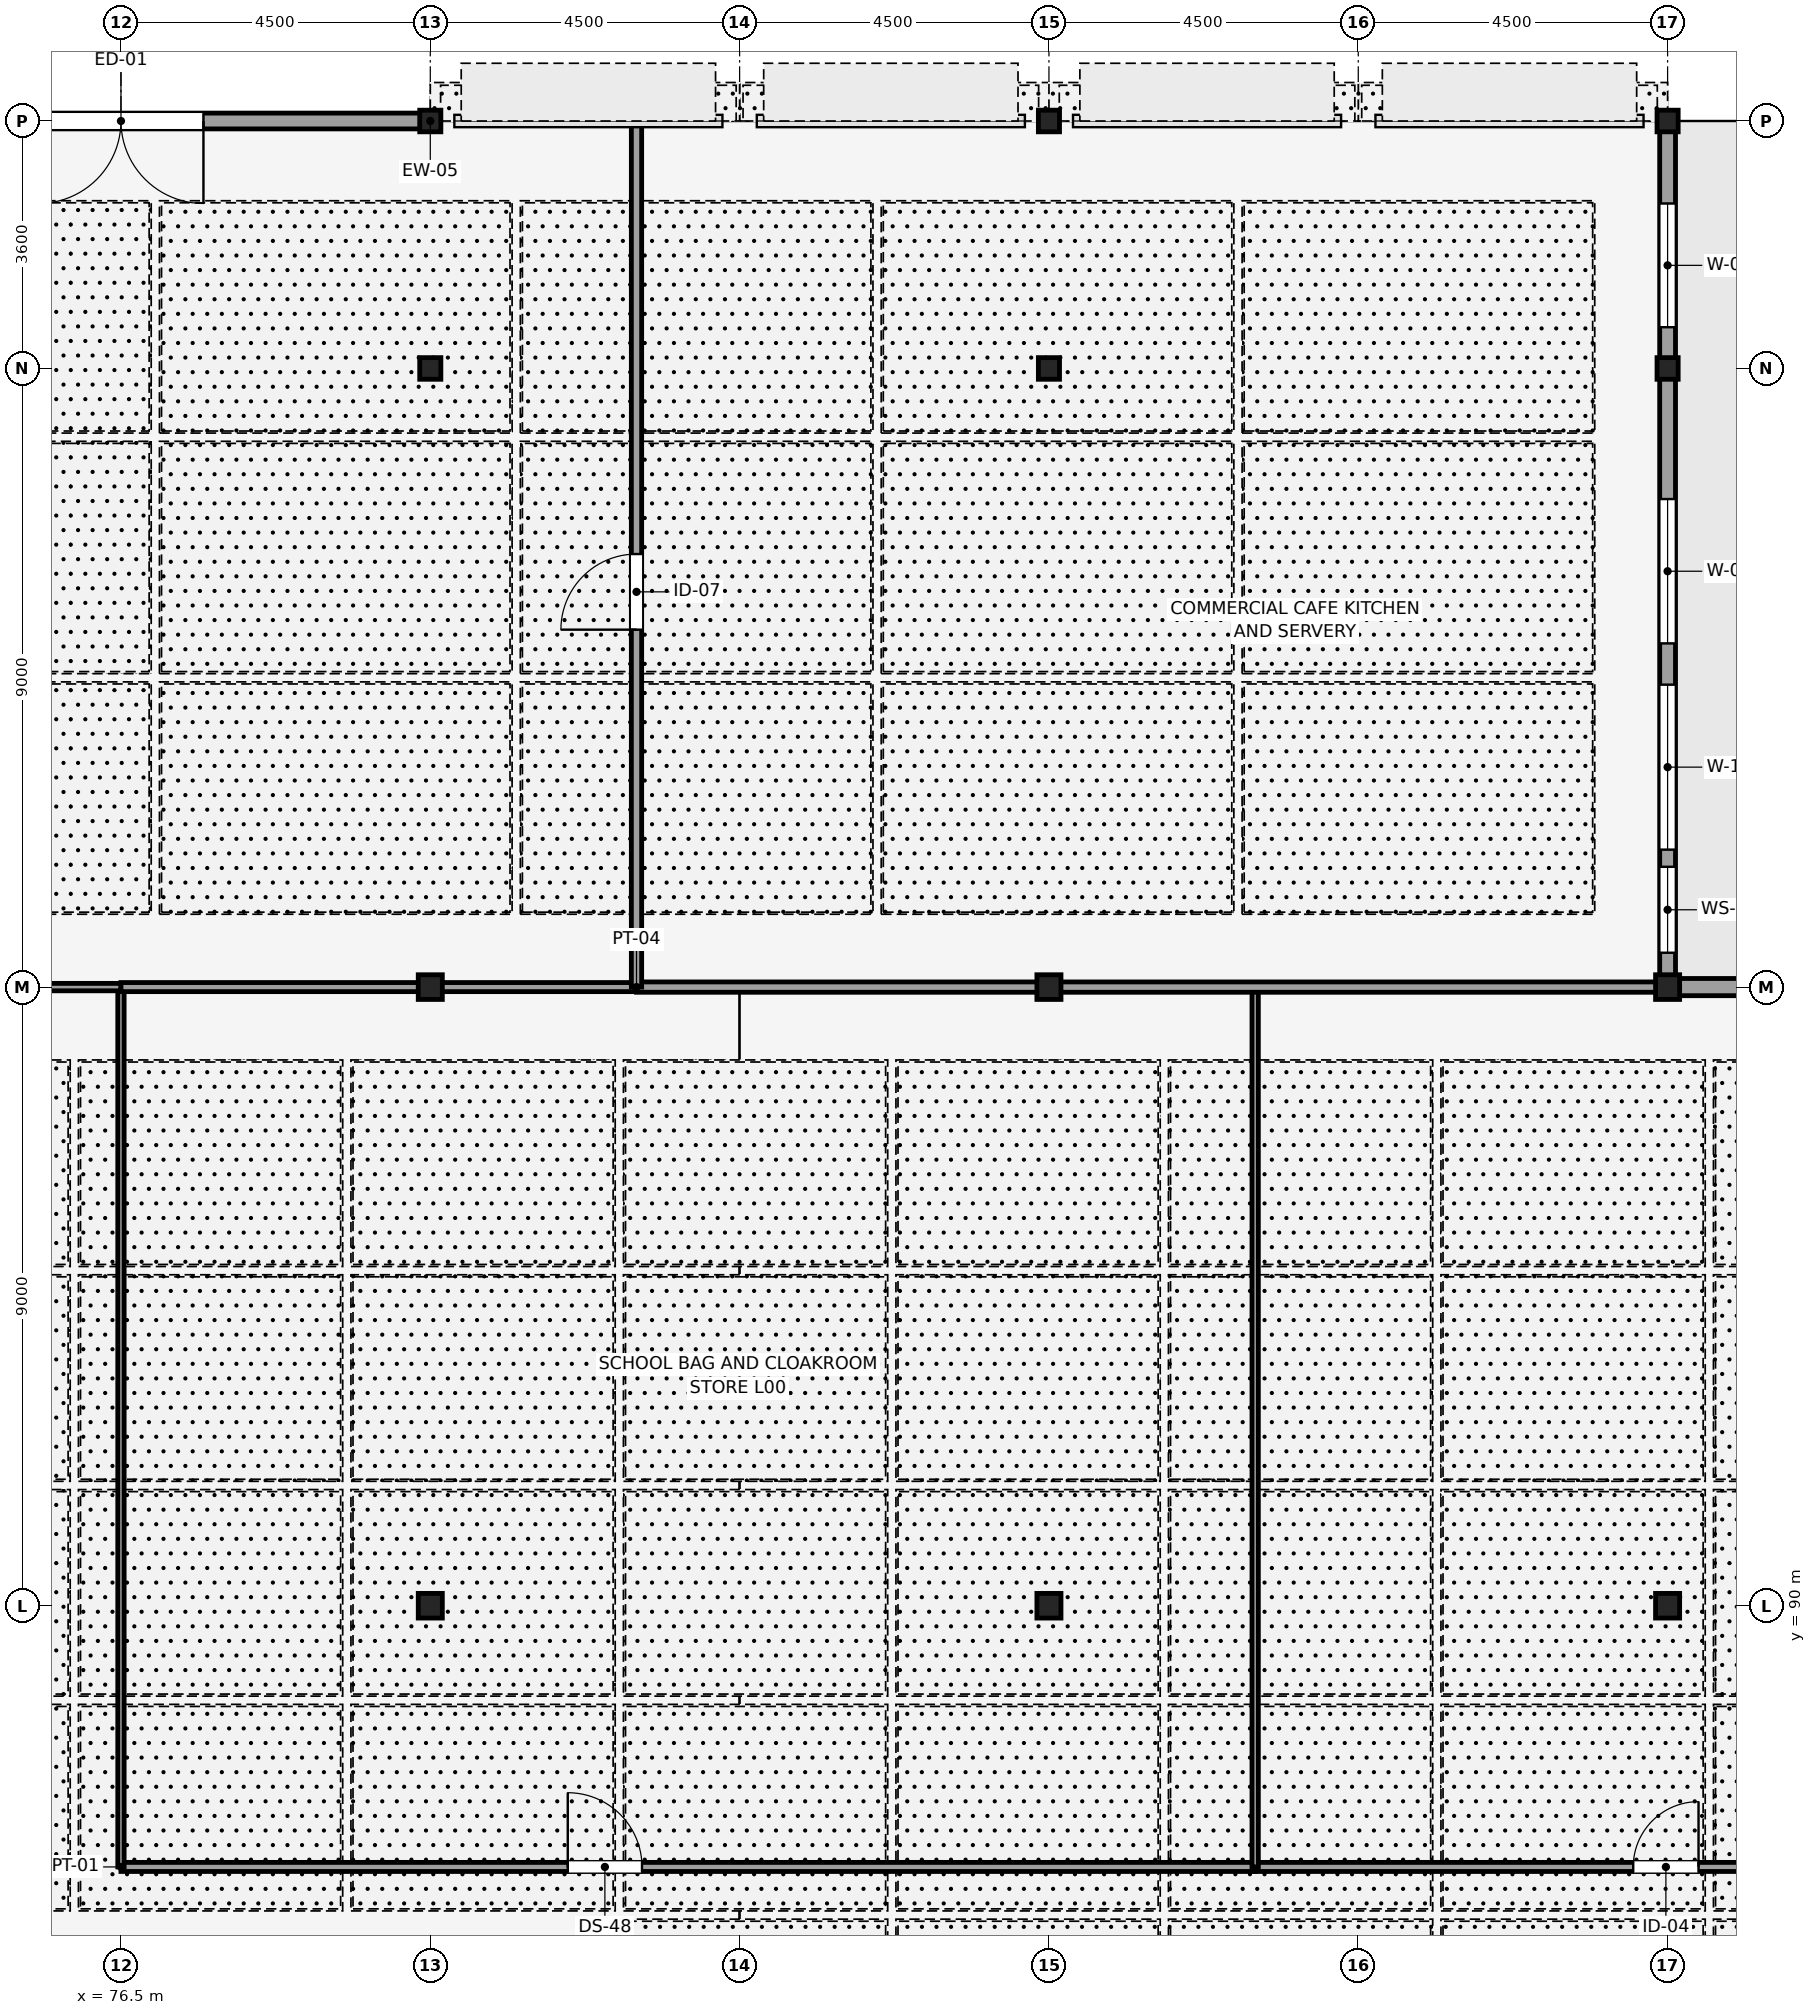
"""IFC4 building model, lengths in metres.
Left out: names, types, materials, properties, quantities, classifications, styles, units other than length and angle.
Written with IfcOpenShell. Run it as: python <this file> out.ifc"""

import sys

from ifc_helpers import new_model, si_unit, direction, frame, frame_2d, origin, origin_2d, place, context, subcontext, project, spatial, rectangle, i_section, extrude, element, fill, save


model = new_model("IFC4")
c1 = context("Model", 3, precision=1e-05, world=origin(), true_north=direction((0.0, 1.0)))
c2 = subcontext(c1, "Body", "Model", "MODEL_VIEW")
j1 = project(units=[si_unit("LENGTHUNIT", "METRE"), si_unit("PLANEANGLEUNIT", "RADIAN")], contexts=[c1])
p1 = place(None, origin())
s1 = spatial("IfcSite", under=j1, at=p1, CompositionType="ELEMENT")
p2 = place(p1, origin())
s2 = spatial("IfcBuilding", under=s1, at=p2, CompositionType="ELEMENT")
p3 = place(p2, origin())
s3 = spatial("IfcBuildingStorey", under=s2, at=p3, CompositionType="ELEMENT", Elevation=0.0)
for number, where, z_axis, x_axis in (
    (1, (81.0, 90.0, 0.0), (0.0, 0.0, 1.0), (1.0, 0.0, 0.0)),
    (2, (81.0, 99.0, 0.0), (0.0, 0.0, 1.0), (1.0, 0.0, 0.0)),
):
    element("IfcColumn", number, at=place(p3, frame(where, z_axis=z_axis, x_axis=x_axis)), inside=s3, PredefinedType="COLUMN", context=c2, shape_type="SweptSolid", body=[
        extrude(i_section(OverallWidth=0.35, OverallDepth=0.359, WebThickness=0.016, FlangeThickness=0.024, FilletRadius=0.014, at=origin_2d()), origin(), (0.0, 0.0, 1.0), 5.4),
    ])
for number, where, z_axis, x_axis in (
    (3, (81.0, 108.0, 0.0), (0.0, 0.0, 1.0), (1.0, 0.0, 0.0)),
    (4, (81.0, 111.6, 0.0), (0.0, 0.0, 1.0), (1.0, 0.0, 0.0)),
):
    element("IfcColumn", number, at=place(p3, frame(where, z_axis=z_axis, x_axis=x_axis)), inside=s3, PredefinedType="COLUMN", context=c2, shape_type="SweptSolid", body=[
        extrude(i_section(OverallWidth=0.307, OverallDepth=0.315, WebThickness=0.012, FlangeThickness=0.019, FilletRadius=0.017, at=origin_2d()), origin(), (0.0, 0.0, 1.0), 5.4),
    ])
for number, where, z_axis, x_axis in (
    (5, (90.0, 90.0, 0.0), (0.0, 0.0, 1.0), (1.0, 0.0, 0.0)),
    (6, (90.0, 99.0, 0.0), (0.0, 0.0, 1.0), (1.0, 0.0, 0.0)),
):
    element("IfcColumn", number, at=place(p3, frame(where, z_axis=z_axis, x_axis=x_axis)), inside=s3, PredefinedType="COLUMN", context=c2, shape_type="SweptSolid", body=[
        extrude(i_section(OverallWidth=0.35, OverallDepth=0.359, WebThickness=0.016, FlangeThickness=0.024, FilletRadius=0.014, at=origin_2d()), origin(), (0.0, 0.0, 1.0), 5.4),
    ])
for number, where, z_axis, x_axis in (
    (7, (90.0, 108.0, 0.0), (0.0, 0.0, 1.0), (1.0, 0.0, 0.0)),
    (8, (90.0, 111.6, 0.0), (0.0, 0.0, 1.0), (1.0, 0.0, 0.0)),
):
    element("IfcColumn", number, at=place(p3, frame(where, z_axis=z_axis, x_axis=x_axis)), inside=s3, PredefinedType="COLUMN", context=c2, shape_type="SweptSolid", body=[
        extrude(i_section(OverallWidth=0.307, OverallDepth=0.315, WebThickness=0.012, FlangeThickness=0.019, FilletRadius=0.017, at=origin_2d()), origin(), (0.0, 0.0, 1.0), 5.4),
    ])
for number, where, z_axis, x_axis in (
    (9, (99.0, 90.0, 0.0), (0.0, 0.0, 1.0), (1.0, 0.0, 0.0)),
    (10, (99.0, 99.0, 0.0), (0.0, 0.0, 1.0), (1.0, 0.0, 0.0)),
):
    element("IfcColumn", number, at=place(p3, frame(where, z_axis=z_axis, x_axis=x_axis)), inside=s3, PredefinedType="COLUMN", context=c2, shape_type="SweptSolid", body=[
        extrude(i_section(OverallWidth=0.35, OverallDepth=0.359, WebThickness=0.016, FlangeThickness=0.024, FilletRadius=0.014, at=origin_2d()), origin(), (0.0, 0.0, 1.0), 5.4),
    ])
for number, where, z_axis, x_axis in (
    (11, (99.0, 108.0, 0.0), (0.0, 0.0, 1.0), (1.0, 0.0, 0.0)),
    (12, (99.0, 111.6, 0.0), (0.0, 0.0, 1.0), (1.0, 0.0, 0.0)),
):
    element("IfcColumn", number, at=place(p3, frame(where, z_axis=z_axis, x_axis=x_axis)), inside=s3, PredefinedType="COLUMN", context=c2, shape_type="SweptSolid", body=[
        extrude(i_section(OverallWidth=0.307, OverallDepth=0.315, WebThickness=0.012, FlangeThickness=0.019, FilletRadius=0.017, at=origin_2d()), origin(), (0.0, 0.0, 1.0), 5.4),
    ])
p4 = place(p3, frame((81.0, 111.6, 0.0), z_axis=(0.0, 0.0, 1.0), x_axis=(-1.0, 0.0, 0.0)))
e13 = element("IfcWall", 13, at=p4, inside=s3, PredefinedType="STANDARD", context=c2, shape_type="SweptSolid", body=[
    extrude(rectangle(XDim=9.0, YDim=0.23, at=frame_2d((4.5, 0.0))), origin(), (0.0, 0.0, 1.0), 5.22),
])
p5 = place(p4, frame((3.3, 0.0, 0.0)))
e14 = element("IfcOpeningElement", 14, at=p5, cuts=e13, PredefinedType="OPENING", context=c2, shape_type="SweptSolid", body=[
    extrude(rectangle(XDim=2.4, YDim=2.7, at=frame_2d((1.2, 1.35))), frame((0.0, 0.125, 0.0), z_axis=(0.0, -1.0, 0.0), x_axis=(1.0, 0.0, 0.0)), (0.0, 0.0, 1.0), 0.25),
])
p6 = place(p3, frame((99.0, 99.0, 0.0), z_axis=(0.0, 0.0, 1.0), x_axis=(0.0, 1.0, 0.0)))
e15 = element("IfcWall", 15, at=p6, inside=s3, PredefinedType="STANDARD", context=c2, shape_type="SweptSolid", body=[
    extrude(rectangle(XDim=12.6, YDim=0.23, at=frame_2d((6.3, 0.0))), origin(), (0.0, 0.0, 1.0), 4.672),
])
p7 = place(p6, frame((2.0, 0.0, 1.0)))
e16 = element("IfcOpeningElement", 16, at=p7, cuts=e15, PredefinedType="OPENING", context=c2, shape_type="SweptSolid", body=[
    extrude(rectangle(XDim=2.4, YDim=1.5, at=frame_2d((1.2, 0.75))), frame((0.0, 0.125, 0.0), z_axis=(0.0, -1.0, 0.0), x_axis=(1.0, 0.0, 0.0)), (0.0, 0.0, 1.0), 0.25),
])
p8 = place(p6, frame((9.6, 0.0, 1.0)))
e17 = element("IfcOpeningElement", 17, at=p8, cuts=e15, PredefinedType="OPENING", context=c2, shape_type="SweptSolid", body=[
    extrude(rectangle(XDim=1.8, YDim=1.5, at=frame_2d((0.9, 0.75))), frame((0.0, 0.125, 0.0), z_axis=(0.0, -1.0, 0.0), x_axis=(1.0, 0.0, 0.0)), (0.0, 0.0, 1.0), 0.25),
])
p9 = place(p6, frame((5.0, 0.0, 0.9)))
e18 = element("IfcOpeningElement", 18, at=p9, cuts=e15, PredefinedType="OPENING", context=c2, shape_type="SweptSolid", body=[
    extrude(rectangle(XDim=2.1, YDim=2.1, at=frame_2d((1.05, 1.05))), frame((0.0, 0.125, 0.0), z_axis=(0.0, -1.0, 0.0), x_axis=(1.0, 0.0, 0.0)), (0.0, 0.0, 1.0), 0.25),
])
p10 = place(p6, frame((0.5, 0.0, 1.0)))
e19 = element("IfcOpeningElement", 19, at=p10, cuts=e15, PredefinedType="OPENING", context=c2, shape_type="SweptSolid", body=[
    extrude(rectangle(XDim=1.25, YDim=1.45, at=frame_2d((0.625, 0.725))), frame((0.0, 0.125, 0.0), z_axis=(0.0, -1.0, 0.0), x_axis=(1.0, 0.0, 0.0)), (0.0, 0.0, 1.0), 0.25),
])
p11 = place(p3, frame((112.5, 99.0, 0.0), z_axis=(0.0, 0.0, 1.0), x_axis=(-1.0, 0.0, 0.0)))
e20 = element("IfcWall", 20, at=p11, inside=s3, PredefinedType="STANDARD", context=c2, shape_type="SweptSolid", body=[
    extrude(rectangle(XDim=13.5, YDim=0.25, at=frame_2d((6.75, 0.0))), origin(), (0.0, 0.0, 1.0), 4.667),
])
p12 = place(p11, frame((1.35, 0.0, 1.0)))
e21 = element("IfcOpeningElement", 21, at=p12, cuts=e20, PredefinedType="OPENING", context=c2, shape_type="SweptSolid", body=[
    extrude(rectangle(XDim=1.8, YDim=1.5, at=frame_2d((0.9, 0.75))), frame((0.0, 0.135, 0.0), z_axis=(0.0, -1.0, 0.0), x_axis=(1.0, 0.0, 0.0)), (0.0, 0.0, 1.0), 0.27),
])
p13 = place(p11, frame((9.6, 0.0, 1.0)))
e22 = element("IfcOpeningElement", 22, at=p13, cuts=e20, PredefinedType="OPENING", context=c2, shape_type="SweptSolid", body=[
    extrude(rectangle(XDim=1.8, YDim=1.5, at=frame_2d((0.9, 0.75))), frame((0.0, 0.135, 0.0), z_axis=(0.0, -1.0, 0.0), x_axis=(1.0, 0.0, 0.0)), (0.0, 0.0, 1.0), 0.27),
])
p14 = place(p11, frame((5.6, 0.0, 1.0)))
e23 = element("IfcOpeningElement", 23, at=p14, cuts=e20, PredefinedType="OPENING", context=c2, shape_type="SweptSolid", body=[
    extrude(rectangle(XDim=3.0, YDim=1.5, at=frame_2d((1.5, 0.75))), frame((0.0, 0.135, 0.0), z_axis=(0.0, -1.0, 0.0), x_axis=(1.0, 0.0, 0.0)), (0.0, 0.0, 1.0), 0.27),
])
p15 = place(p3, frame((76.5, 86.2, 0.0), z_axis=(0.0, 0.0, 1.0), x_axis=(1.0, 0.0, 0.0)))
e24 = element("IfcWall", 24, at=p15, inside=s3, PredefinedType="PARTITIONING", context=c2, shape_type="SweptSolid", body=[
    extrude(rectangle(XDim=16.5, YDim=0.132, at=frame_2d((8.25, 0.0))), origin(), (0.0, 0.0, 1.0), 5.22),
])
p16 = place(p15, frame((6.5, 0.0, 0.0)))
e25 = element("IfcOpeningElement", 25, at=p16, cuts=e24, PredefinedType="OPENING", context=c2, shape_type="SweptSolid", body=[
    extrude(rectangle(XDim=1.08, YDim=2.3, at=frame_2d((0.54, 1.15))), frame((0.0, 0.076, 0.0), z_axis=(0.0, -1.0, 0.0), x_axis=(1.0, 0.0, 0.0)), (0.0, 0.0, 1.0), 0.152),
])
p17 = place(p3, frame((93.0, 86.2, 0.0), z_axis=(0.0, 0.0, 1.0), x_axis=(1.0, 0.0, 0.0)))
e26 = element("IfcWall", 26, at=p17, inside=s3, PredefinedType="PARTITIONING", context=c2, shape_type="SweptSolid", body=[
    extrude(rectangle(XDim=19.5, YDim=0.132, at=frame_2d((9.75, 0.0))), origin(), (0.0, 0.0, 1.0), 5.22),
])
p18 = place(p17, frame((5.5, 0.0, 0.0)))
e27 = element("IfcOpeningElement", 27, at=p18, cuts=e26, PredefinedType="OPENING", context=c2, shape_type="SweptSolid", body=[
    extrude(rectangle(XDim=0.95, YDim=2.15, at=frame_2d((0.475, 1.075))), frame((0.0, 0.076, 0.0), z_axis=(0.0, -1.0, 0.0), x_axis=(1.0, 0.0, 0.0)), (0.0, 0.0, 1.0), 0.152),
])
for number, where, z_axis, x_axis in (
    (28, (76.5, 86.2, 0.0), (0.0, 0.0, 1.0), (0.0, 1.0, 0.0)),
    (29, (93.0, 86.2, 0.0), (0.0, 0.0, 1.0), (0.0, 1.0, 0.0)),
):
    element("IfcWall", number, at=place(p3, frame(where, z_axis=z_axis, x_axis=x_axis)), inside=s3, PredefinedType="PARTITIONING", context=c2, shape_type="SweptSolid", body=[
        extrude(rectangle(XDim=12.8, YDim=0.092, at=frame_2d((6.4, 0.0))), origin(), (0.0, 0.0, 1.0), 5.22),
    ])
p19 = place(p3, frame((72.0, 99.0, 0.0), z_axis=(0.0, 0.0, 1.0), x_axis=(1.0, 0.0, 0.0)))
e30 = element("IfcWall", 30, at=p19, inside=s3, PredefinedType="PARTITIONING", context=c2, shape_type="SweptSolid", body=[
    extrude(rectangle(XDim=4.5, YDim=0.108, at=frame_2d((2.25, 0.0))), origin(), (0.0, 0.0, 1.0), 4.667),
])
p20 = place(p19, frame((1.25, 0.0, 0.0)))
e31 = element("IfcOpeningElement", 31, at=p20, cuts=e30, PredefinedType="OPENING", context=c2, shape_type="SweptSolid", body=[
    extrude(rectangle(XDim=2.0, YDim=2.4, at=frame_2d((1.0, 1.2))), frame((0.0, 0.064, 0.0), z_axis=(0.0, -1.0, 0.0), x_axis=(1.0, 0.0, 0.0)), (0.0, 0.0, 1.0), 0.128),
])
p21 = place(p3, frame((76.5, 99.0, 0.0), z_axis=(0.0, 0.0, 1.0), x_axis=(1.0, 0.0, 0.0)))
e32 = element("IfcWall", 32, at=p21, inside=s3, PredefinedType="PARTITIONING", context=c2, shape_type="SweptSolid", body=[
    extrude(rectangle(XDim=7.5, YDim=0.132, at=frame_2d((3.75, 0.0))), origin(), (0.0, 0.0, 1.0), 4.667),
])
p22 = place(p3, frame((84.0, 99.0, 0.0), z_axis=(0.0, 0.0, 1.0), x_axis=(1.0, 0.0, 0.0)))
e33 = element("IfcWall", 33, at=p22, inside=s3, PredefinedType="PARTITIONING", context=c2, shape_type="SweptSolid", body=[
    extrude(rectangle(XDim=15.0, YDim=0.15, at=frame_2d((7.5, 0.0))), origin(), (0.0, 0.0, 1.0), 4.667),
])
p23 = place(p3, frame((84.0, 99.0, 0.0), z_axis=(0.0, 0.0, 1.0), x_axis=(0.0, 1.0, 0.0)))
e34 = element("IfcWall", 34, at=p23, inside=s3, PredefinedType="PARTITIONING", context=c2, shape_type="SweptSolid", body=[
    extrude(rectangle(XDim=12.6, YDim=0.15, at=frame_2d((6.3, 0.0))), origin(), (0.0, 0.0, 1.0), 5.22),
])
p24 = place(p23, frame((5.2, 0.0, 0.0)))
e35 = element("IfcOpeningElement", 35, at=p24, cuts=e34, PredefinedType="OPENING", context=c2, shape_type="SweptSolid", body=[
    extrude(rectangle(XDim=1.1, YDim=2.15, at=frame_2d((0.55, 1.075))), frame((0.0, 0.085, 0.0), z_axis=(0.0, -1.0, 0.0), x_axis=(1.0, 0.0, 0.0)), (0.0, 0.0, 1.0), 0.17),
])
p25 = place(p5, origin())
e36 = element("IfcDoor", 36, at=p25, inside=s3, OperationType="DOUBLE_DOOR_SINGLE_SWING", PredefinedType="DOOR", context=c2, shape_type="SweptSolid", body=[
    extrude(rectangle(XDim=2.4, YDim=2.7, at=frame_2d((1.2, 1.35))), frame((0.0, 0.025, 0.0), z_axis=(0.0, -1.0, 0.0), x_axis=(1.0, 0.0, 0.0)), (0.0, 0.0, 1.0), 0.05),
])
fill(e14, e36)
p26 = place(p7, origin())
e37 = element("IfcWindow", 37, at=p26, inside=s3, PartitioningType="SINGLE_PANEL", PredefinedType="WINDOW", context=c2, shape_type="SweptSolid", body=[
    extrude(rectangle(XDim=2.4, YDim=1.5, at=frame_2d((1.2, 0.75))), frame((0.0, 0.03, 0.0), z_axis=(0.0, -1.0, 0.0), x_axis=(1.0, 0.0, 0.0)), (0.0, 0.0, 1.0), 0.06),
])
fill(e16, e37)
p27 = place(p8, origin())
e38 = element("IfcWindow", 38, at=p27, inside=s3, PartitioningType="SINGLE_PANEL", PredefinedType="WINDOW", context=c2, shape_type="SweptSolid", body=[
    extrude(rectangle(XDim=1.8, YDim=1.5, at=frame_2d((0.9, 0.75))), frame((0.0, 0.03, 0.0), z_axis=(0.0, -1.0, 0.0), x_axis=(1.0, 0.0, 0.0)), (0.0, 0.0, 1.0), 0.06),
])
fill(e17, e38)
p28 = place(p9, origin())
e39 = element("IfcWindow", 39, at=p28, inside=s3, PartitioningType="SINGLE_PANEL", PredefinedType="WINDOW", context=c2, shape_type="SweptSolid", body=[
    extrude(rectangle(XDim=2.1, YDim=2.1, at=frame_2d((1.05, 1.05))), frame((0.0, 0.03, 0.0), z_axis=(0.0, -1.0, 0.0), x_axis=(1.0, 0.0, 0.0)), (0.0, 0.0, 1.0), 0.06),
])
fill(e18, e39)
p29 = place(p10, origin())
e40 = element("IfcWindow", 40, at=p29, inside=s3, PartitioningType="SINGLE_PANEL", PredefinedType="WINDOW", context=c2, shape_type="SweptSolid", body=[
    extrude(rectangle(XDim=1.25, YDim=1.45, at=frame_2d((0.625, 0.725))), frame((0.0, 0.03, 0.0), z_axis=(0.0, -1.0, 0.0), x_axis=(1.0, 0.0, 0.0)), (0.0, 0.0, 1.0), 0.06),
])
fill(e19, e40)
p30 = place(p16, origin())
e41 = element("IfcDoor", 41, at=p30, inside=s3, OperationType="SINGLE_SWING_LEFT", PredefinedType="DOOR", context=c2, shape_type="SweptSolid", body=[
    extrude(rectangle(XDim=1.08, YDim=2.3, at=frame_2d((0.54, 1.15))), frame((0.0, 0.025, 0.0), z_axis=(0.0, -1.0, 0.0), x_axis=(1.0, 0.0, 0.0)), (0.0, 0.0, 1.0), 0.05),
])
fill(e25, e41)
p31 = place(p18, origin())
e42 = element("IfcDoor", 42, at=p31, inside=s3, OperationType="SINGLE_SWING_RIGHT", PredefinedType="DOOR", context=c2, shape_type="SweptSolid", body=[
    extrude(rectangle(XDim=0.95, YDim=2.15, at=frame_2d((0.475, 1.075))), frame((0.0, 0.025, 0.0), z_axis=(0.0, -1.0, 0.0), x_axis=(1.0, 0.0, 0.0)), (0.0, 0.0, 1.0), 0.05),
])
fill(e27, e42)
p32 = place(p24, origin())
e43 = element("IfcDoor", 43, at=p32, inside=s3, OperationType="SINGLE_SWING_LEFT", PredefinedType="DOOR", context=c2, shape_type="SweptSolid", body=[
    extrude(rectangle(XDim=1.1, YDim=2.15, at=frame_2d((0.55, 1.075))), frame((0.0, 0.025, 0.0), z_axis=(0.0, -1.0, 0.0), x_axis=(1.0, 0.0, 0.0)), (0.0, 0.0, 1.0), 0.05),
])
fill(e35, e43)
save(model, sys.argv[1])
